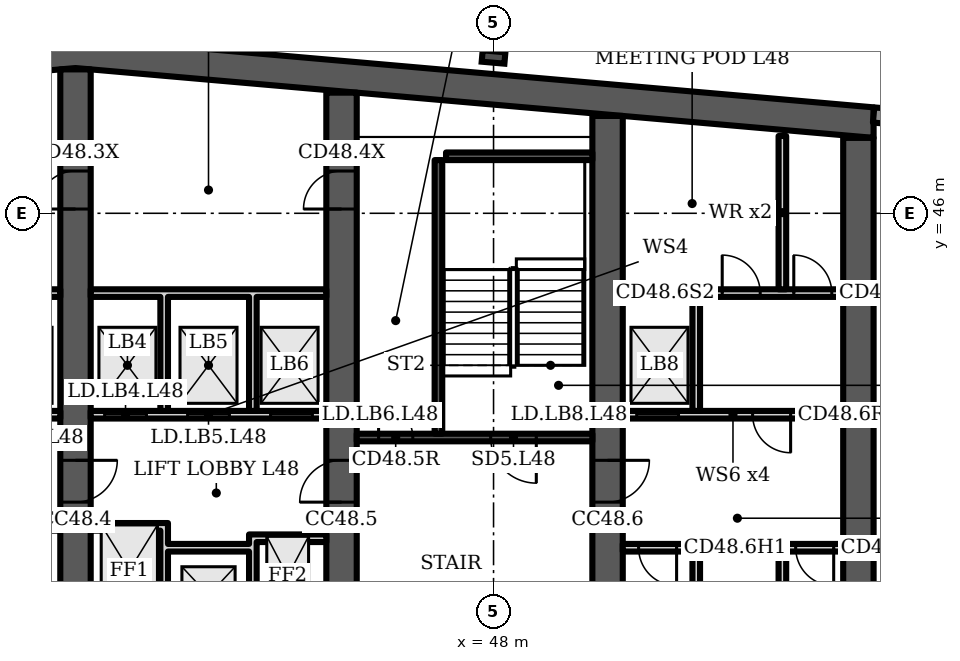
"""IFC4 building model, lengths in metres.
Left out: names, types, materials, properties, quantities, classifications, styles, units other than length and angle.
Written with IfcOpenShell. Run it as: python <this file> out.ifc"""

import sys

from ifc_helpers import new_model, si_unit, direction, frame, frame_2d, origin, origin_2d, place, context, subcontext, project, spatial, polyline, rectangle, i_section, outline, extrude, element, fill, save


model = new_model("IFC4")
c1 = context("Model", 3, precision=1e-05, world=origin(), true_north=direction((0.0, 1.0)))
c2 = subcontext(c1, "Body", "Model", "MODEL_VIEW")
j1 = project(units=[si_unit("LENGTHUNIT", "METRE"), si_unit("PLANEANGLEUNIT", "RADIAN")], contexts=[c1])
p1 = place(None, origin())
s1 = spatial("IfcSite", under=j1, at=p1, CompositionType="ELEMENT")
p2 = place(p1, origin())
s2 = spatial("IfcBuilding", under=s1, at=p2, CompositionType="ELEMENT")
p3 = place(p2, frame((0.0, 0.0, 195.1)))
s3 = spatial("IfcBuildingStorey", under=s2, at=p3, CompositionType="ELEMENT", Elevation=195.1)
p4 = place(p3, frame((0.0, 0.0, -0.0)))
e1 = element("IfcWall", 1, at=p4, inside=s3, PredefinedType="SHEAR", context=c2, shape_type="SweptSolid", body=[
    extrude(outline(polyline([(16.0, 47.984), (37.0, 49.822), (58.0, 47.984), (58.0, 48.787), (37.0, 50.625), (16.0, 48.787), (16.0, 47.984)])), origin(), (0.0, 0.0, 1.0), 3.6),
])
p5 = place(p3, frame((37.0, 34.8, 0.0), z_axis=(0.0, 0.0, 1.0), x_axis=(0.0, 1.0, 0.0)))
e2 = element("IfcWall", 2, at=p5, inside=s3, PredefinedType="SHEAR", context=c2, shape_type="SweptSolid", body=[
    extrude(rectangle(XDim=14.987, YDim=0.8, at=frame_2d((7.493, 0.0))), origin(), (0.0, 0.0, 1.0), 3.6),
])
p6 = place(p5, frame((11.312, 0.0, 0.0)))
e3 = element("IfcOpeningElement", 3, at=p6, cuts=e2, PredefinedType="OPENING", context=c2, shape_type="SweptSolid", body=[
    extrude(rectangle(XDim=1.0, YDim=2.1, at=frame_2d((0.5, 1.05))), frame((0.0, 0.41, 0.0), z_axis=(0.0, -1.0, 0.0), x_axis=(1.0, 0.0, 0.0)), (0.0, 0.0, 1.0), 0.82),
])
p7 = place(p5, frame((3.6, 0.0, 0.0)))
e4 = element("IfcOpeningElement", 4, at=p7, cuts=e2, PredefinedType="OPENING", context=c2, shape_type="SweptSolid", body=[
    extrude(rectangle(XDim=1.1, YDim=2.1, at=frame_2d((0.55, 1.05))), frame((0.0, 0.41, 0.0), z_axis=(0.0, -1.0, 0.0), x_axis=(1.0, 0.0, 0.0)), (0.0, 0.0, 1.0), 0.82),
])
p8 = place(p3, frame((44.0, 34.8, 0.0), z_axis=(0.0, 0.0, 1.0), x_axis=(0.0, 1.0, 0.0)))
e5 = element("IfcWall", 5, at=p8, inside=s3, PredefinedType="SHEAR", context=c2, shape_type="SweptSolid", body=[
    extrude(rectangle(XDim=14.374, YDim=0.8, at=frame_2d((7.187, 0.0))), origin(), (0.0, 0.0, 1.0), 3.6),
])
p9 = place(p8, frame((11.312, 0.0, 0.0)))
e6 = element("IfcOpeningElement", 6, at=p9, cuts=e5, PredefinedType="OPENING", context=c2, shape_type="SweptSolid", body=[
    extrude(rectangle(XDim=1.0, YDim=2.1, at=frame_2d((0.5, 1.05))), frame((0.0, 0.41, 0.0), z_axis=(0.0, -1.0, 0.0), x_axis=(1.0, 0.0, 0.0)), (0.0, 0.0, 1.0), 0.82),
])
p10 = place(p8, frame((3.6, 0.0, 0.0)))
e7 = element("IfcOpeningElement", 7, at=p10, cuts=e5, PredefinedType="OPENING", context=c2, shape_type="SweptSolid", body=[
    extrude(rectangle(XDim=1.1, YDim=2.1, at=frame_2d((0.55, 1.05))), frame((0.0, 0.41, 0.0), z_axis=(0.0, -1.0, 0.0), x_axis=(1.0, 0.0, 0.0)), (0.0, 0.0, 1.0), 0.82),
])
p11 = place(p3, frame((51.0, 34.8, 0.0), z_axis=(0.0, 0.0, 1.0), x_axis=(0.0, 1.0, 0.0)))
e8 = element("IfcWall", 8, at=p11, inside=s3, PredefinedType="SHEAR", context=c2, shape_type="SweptSolid", body=[
    extrude(rectangle(XDim=13.762, YDim=0.8, at=frame_2d((6.881, 0.0))), origin(), (0.0, 0.0, 1.0), 3.6),
])
p12 = place(p11, frame((3.6, 0.0, 0.0)))
e9 = element("IfcOpeningElement", 9, at=p12, cuts=e8, PredefinedType="OPENING", context=c2, shape_type="SweptSolid", body=[
    extrude(rectangle(XDim=1.1, YDim=2.1, at=frame_2d((0.55, 1.05))), frame((0.0, 0.41, 0.0), z_axis=(0.0, -1.0, 0.0), x_axis=(1.0, 0.0, 0.0)), (0.0, 0.0, 1.0), 0.82),
])
p13 = place(p3, frame((57.6, 34.8, 0.0), z_axis=(0.0, 0.0, 1.0), x_axis=(0.0, 1.0, 0.0)))
e10 = element("IfcWall", 10, at=p13, inside=s3, PredefinedType="SHEAR", context=c2, shape_type="SweptSolid", body=[
    extrude(rectangle(XDim=13.184, YDim=0.8, at=frame_2d((6.592, 0.0))), origin(), (0.0, 0.0, 1.0), 3.6),
])
p14 = place(p3, frame((48.0, 50.112, 0.0), z_axis=(0.0, 0.0, 1.0), x_axis=(0.087156, 0.996198, 0.0)))
e11 = element("IfcColumn", 11, at=p14, inside=s3, PredefinedType="COLUMN", context=c2, shape_type="SweptSolid", body=[
    extrude(i_section(OverallWidth=0.3, OverallDepth=0.6, WebThickness=0.015, FlangeThickness=0.03, FilletRadius=0.027, at=origin_2d()), origin(), (0.0, 0.0, 1.0), 3.6),
])
p15 = place(p3, frame((60.983, 48.326, 0.0), z_axis=(0.0, 0.0, 1.0), x_axis=(-0.996194, 0.087168, 0.0)))
e12 = element("IfcWall", 12, at=p15, inside=s3, PredefinedType="SOLIDWALL", context=c2, shape_type="SweptSolid", body=[
    extrude(rectangle(XDim=2.994, YDim=0.4, at=frame_2d((1.497, 0.0))), origin(), (0.0, 0.0, 1.0), 3.2),
])
p16 = place(p3, frame((30.4, 40.7, 0.0), z_axis=(0.0, 0.0, 1.0), x_axis=(1.0, 0.0, 0.0)))
e13 = element("IfcWall", 13, at=p16, inside=s3, PredefinedType="PARTITIONING", context=c2, shape_type="SweptSolid", body=[
    extrude(rectangle(XDim=6.2, YDim=0.2, at=frame_2d((3.1, 0.0))), origin(), (0.0, 0.0, 1.0), 3.2),
])
p17 = place(p16, frame((0.367, 0.0, 0.0)))
e14 = element("IfcOpeningElement", 14, at=p17, cuts=e13, PredefinedType="OPENING", context=c2, shape_type="SweptSolid", body=[
    extrude(rectangle(XDim=1.1, YDim=2.1, at=frame_2d((0.55, 1.05))), frame((0.0, 0.11, 0.0), z_axis=(0.0, -1.0, 0.0), x_axis=(1.0, 0.0, 0.0)), (0.0, 0.0, 1.0), 0.22),
])
p18 = place(p16, frame((2.55, 0.0, 0.0)))
e15 = element("IfcOpeningElement", 15, at=p18, cuts=e13, PredefinedType="OPENING", context=c2, shape_type="SweptSolid", body=[
    extrude(rectangle(XDim=1.1, YDim=2.1, at=frame_2d((0.55, 1.05))), frame((0.0, 0.11, 0.0), z_axis=(0.0, -1.0, 0.0), x_axis=(1.0, 0.0, 0.0)), (0.0, 0.0, 1.0), 0.22),
])
p19 = place(p16, frame((4.733, 0.0, 0.0)))
e16 = element("IfcOpeningElement", 16, at=p19, cuts=e13, PredefinedType="OPENING", context=c2, shape_type="SweptSolid", body=[
    extrude(rectangle(XDim=1.1, YDim=2.1, at=frame_2d((0.55, 1.05))), frame((0.0, 0.11, 0.0), z_axis=(0.0, -1.0, 0.0), x_axis=(1.0, 0.0, 0.0)), (0.0, 0.0, 1.0), 0.22),
])
p20 = place(p3, frame((0.0, 0.0, -0.0)))
e17 = element("IfcWall", 17, at=p20, inside=s3, PredefinedType="PARTITIONING", context=c2, shape_type="SweptSolid", body=[
    extrude(outline(polyline([(34.567, 37.85), (34.767, 37.85), (36.6, 37.85), (36.6, 37.65), (34.767, 37.65), (34.767, 34.8), (34.567, 34.8), (34.567, 37.85)])), origin(), (0.0, 0.0, 1.0), 3.2),
])
p21 = place(p3, frame((0.0, 0.0, -0.0)))
e18 = element("IfcWall", 18, at=p21, inside=s3, PredefinedType="PARTITIONING", context=c2, shape_type="SweptSolid", body=[
    extrude(outline(polyline([(32.433, 40.8), (32.233, 40.8), (32.233, 43.8), (30.4, 43.8), (30.4, 44.0), (36.6, 44.0), (36.6, 43.8), (34.767, 43.8), (34.767, 40.8), (34.567, 40.8), (34.567, 43.8), (32.433, 43.8), (32.433, 40.8)])), origin(), (0.0, 0.0, 1.0), 3.2),
])
p22 = place(p3, frame((37.4, 40.7, 0.0), z_axis=(0.0, 0.0, 1.0), x_axis=(1.0, 0.0, 0.0)))
e19 = element("IfcWall", 19, at=p22, inside=s3, PredefinedType="PARTITIONING", context=c2, shape_type="SweptSolid", body=[
    extrude(rectangle(XDim=6.2, YDim=0.2, at=frame_2d((3.1, 0.0))), origin(), (0.0, 0.0, 1.0), 3.2),
])
p23 = place(p22, frame((0.367, 0.0, 0.0)))
e20 = element("IfcOpeningElement", 20, at=p23, cuts=e19, PredefinedType="OPENING", context=c2, shape_type="SweptSolid", body=[
    extrude(rectangle(XDim=1.1, YDim=2.1, at=frame_2d((0.55, 1.05))), frame((0.0, 0.11, 0.0), z_axis=(0.0, -1.0, 0.0), x_axis=(1.0, 0.0, 0.0)), (0.0, 0.0, 1.0), 0.22),
])
p24 = place(p22, frame((2.55, 0.0, 0.0)))
e21 = element("IfcOpeningElement", 21, at=p24, cuts=e19, PredefinedType="OPENING", context=c2, shape_type="SweptSolid", body=[
    extrude(rectangle(XDim=1.1, YDim=2.1, at=frame_2d((0.55, 1.05))), frame((0.0, 0.11, 0.0), z_axis=(0.0, -1.0, 0.0), x_axis=(1.0, 0.0, 0.0)), (0.0, 0.0, 1.0), 0.22),
])
p25 = place(p22, frame((4.733, 0.0, 0.0)))
e22 = element("IfcOpeningElement", 22, at=p25, cuts=e19, PredefinedType="OPENING", context=c2, shape_type="SweptSolid", body=[
    extrude(rectangle(XDim=1.1, YDim=2.1, at=frame_2d((0.55, 1.05))), frame((0.0, 0.11, 0.0), z_axis=(0.0, -1.0, 0.0), x_axis=(1.0, 0.0, 0.0)), (0.0, 0.0, 1.0), 0.22),
])
p26 = place(p3, frame((0.0, 0.0, -0.0)))
e23 = element("IfcWall", 23, at=p26, inside=s3, PredefinedType="PARTITIONING", context=c2, shape_type="SweptSolid", body=[
    extrude(outline(polyline([(41.567, 37.1), (39.433, 37.1), (39.433, 34.8), (39.233, 34.8), (39.233, 37.65), (37.4, 37.65), (37.4, 37.85), (39.233, 37.85), (39.433, 37.85), (39.433, 37.3), (41.567, 37.3), (41.567, 37.55), (41.767, 37.55), (43.6, 37.55), (43.6, 37.35), (41.767, 37.35), (41.767, 34.8), (41.567, 34.8), (41.567, 37.1)])), origin(), (0.0, 0.0, 1.0), 3.2),
])
p27 = place(p3, frame((0.0, 0.0, -0.0)))
e24 = element("IfcWall", 24, at=p27, inside=s3, PredefinedType="PARTITIONING", context=c2, shape_type="SweptSolid", body=[
    extrude(outline(polyline([(39.433, 40.8), (39.233, 40.8), (39.233, 43.8), (37.4, 43.8), (37.4, 44.0), (43.6, 44.0), (43.6, 43.8), (41.767, 43.8), (41.767, 40.8), (41.567, 40.8), (41.567, 43.8), (39.433, 43.8), (39.433, 40.8)])), origin(), (0.0, 0.0, 1.0), 3.2),
])
p28 = place(p3, frame((44.4, 40.1, 0.0), z_axis=(0.0, 0.0, 1.0), x_axis=(1.0, 0.0, 0.0)))
e25 = element("IfcWall", 25, at=p28, inside=s3, PredefinedType="SHEAR", context=c2, shape_type="SweptSolid", body=[
    extrude(rectangle(XDim=6.2, YDim=0.2, at=frame_2d((3.1, 0.0))), origin(), (0.0, 0.0, 1.0), 3.2),
])
p29 = place(p28, frame((3.525, 0.0, 0.0)))
e26 = element("IfcOpeningElement", 26, at=p29, cuts=e25, PredefinedType="OPENING", context=c2, shape_type="SweptSolid", body=[
    extrude(rectangle(XDim=1.2, YDim=2.1, at=frame_2d((0.6, 1.05))), frame((0.0, 0.11, 0.0), z_axis=(0.0, -1.0, 0.0), x_axis=(1.0, 0.0, 0.0)), (0.0, 0.0, 1.0), 0.22),
])
p30 = place(p28, frame((0.575, 0.0, 0.0)))
e27 = element("IfcOpeningElement", 27, at=p30, cuts=e25, PredefinedType="OPENING", context=c2, shape_type="SweptSolid", body=[
    extrude(rectangle(XDim=0.9, YDim=2.1, at=frame_2d((0.45, 1.05))), frame((0.0, 0.11, 0.0), z_axis=(0.0, -1.0, 0.0), x_axis=(1.0, 0.0, 0.0)), (0.0, 0.0, 1.0), 0.22),
])
p31 = place(p3, frame((46.55, 40.2, 0.0), z_axis=(0.0, 0.0, 1.0), x_axis=(0.0, 1.0, 0.0)))
e28 = element("IfcWall", 28, at=p31, inside=s3, PredefinedType="SHEAR", context=c2, shape_type="SweptSolid", body=[
    extrude(rectangle(XDim=7.2, YDim=0.2, at=frame_2d((3.6, 0.0))), origin(), (0.0, 0.0, 1.0), 3.2),
])
p32 = place(p3, frame((46.75, 47.5, 0.0), z_axis=(0.0, 0.0, 1.0), x_axis=(1.0, 0.0, 0.0)))
e29 = element("IfcWall", 29, at=p32, inside=s3, PredefinedType="SHEAR", context=c2, shape_type="SweptSolid", body=[
    extrude(rectangle(XDim=3.85, YDim=0.2, at=frame_2d((1.925, 0.0))), origin(), (0.0, 0.0, 1.0), 3.2),
])
p33 = place(p3, frame((51.4, 37.2, 0.0), z_axis=(0.0, 0.0, 1.0), x_axis=(1.0, 0.0, 0.0)))
e30 = element("IfcWall", 30, at=p33, inside=s3, PredefinedType="PARTITIONING", context=c2, shape_type="SweptSolid", body=[
    extrude(rectangle(XDim=1.833, YDim=0.2, at=frame_2d((0.917, 0.0))), origin(), (0.0, 0.0, 1.0), 3.2),
])
p34 = place(p33, frame((0.417, 0.0, 0.0)))
e31 = element("IfcOpeningElement", 31, at=p34, cuts=e30, PredefinedType="OPENING", context=c2, shape_type="SweptSolid", body=[
    extrude(rectangle(XDim=1.0, YDim=2.1, at=frame_2d((0.5, 1.05))), frame((0.0, 0.11, 0.0), z_axis=(0.0, -1.0, 0.0), x_axis=(1.0, 0.0, 0.0)), (0.0, 0.0, 1.0), 0.22),
])
p35 = place(p3, frame((55.7, 37.2, 0.0), z_axis=(0.0, 0.0, 1.0), x_axis=(1.0, 0.0, 0.0)))
e32 = element("IfcWall", 32, at=p35, inside=s3, PredefinedType="PARTITIONING", context=c2, shape_type="SweptSolid", body=[
    extrude(rectangle(XDim=1.5, YDim=0.2, at=frame_2d((0.75, 0.0))), origin(), (0.0, 0.0, 1.0), 3.2),
])
p36 = place(p35, frame((0.25, 0.0, 0.0)))
e33 = element("IfcOpeningElement", 33, at=p36, cuts=e32, PredefinedType="OPENING", context=c2, shape_type="SweptSolid", body=[
    extrude(rectangle(XDim=1.0, YDim=2.1, at=frame_2d((0.5, 1.05))), frame((0.0, 0.11, 0.0), z_axis=(0.0, -1.0, 0.0), x_axis=(1.0, 0.0, 0.0)), (0.0, 0.0, 1.0), 0.22),
])
p37 = place(p3, frame((51.4, 40.7, 0.0), z_axis=(0.0, 0.0, 1.0), x_axis=(1.0, 0.0, 0.0)))
e34 = element("IfcWall", 34, at=p37, inside=s3, PredefinedType="PARTITIONING", context=c2, shape_type="SweptSolid", body=[
    extrude(rectangle(XDim=5.8, YDim=0.2, at=frame_2d((2.9, 0.0))), origin(), (0.0, 0.0, 1.0), 3.2),
])
p38 = place(p37, frame((0.367, 0.0, 0.0)))
e35 = element("IfcOpeningElement", 35, at=p38, cuts=e34, PredefinedType="OPENING", context=c2, shape_type="SweptSolid", body=[
    extrude(rectangle(XDim=1.1, YDim=2.1, at=frame_2d((0.55, 1.05))), frame((0.0, 0.11, 0.0), z_axis=(0.0, -1.0, 0.0), x_axis=(1.0, 0.0, 0.0)), (0.0, 0.0, 1.0), 0.22),
])
p39 = place(p37, frame((3.417, 0.0, 0.0)))
e36 = element("IfcOpeningElement", 36, at=p39, cuts=e34, PredefinedType="OPENING", context=c2, shape_type="SweptSolid", body=[
    extrude(rectangle(XDim=1.0, YDim=2.1, at=frame_2d((0.5, 1.05))), frame((0.0, 0.11, 0.0), z_axis=(0.0, -1.0, 0.0), x_axis=(1.0, 0.0, 0.0)), (0.0, 0.0, 1.0), 0.22),
])
p40 = place(p3, frame((51.4, 43.9, 0.0), z_axis=(0.0, 0.0, 1.0), x_axis=(1.0, 0.0, 0.0)))
e37 = element("IfcWall", 37, at=p40, inside=s3, PredefinedType="PARTITIONING", context=c2, shape_type="SweptSolid", body=[
    extrude(rectangle(XDim=5.8, YDim=0.2, at=frame_2d((2.9, 0.0))), origin(), (0.0, 0.0, 1.0), 3.2),
])
p41 = place(p40, frame((2.617, 0.0, 0.0)))
e38 = element("IfcOpeningElement", 38, at=p41, cuts=e37, PredefinedType="OPENING", context=c2, shape_type="SweptSolid", body=[
    extrude(rectangle(XDim=1.0, YDim=2.1, at=frame_2d((0.5, 1.05))), frame((0.0, 0.11, 0.0), z_axis=(0.0, -1.0, 0.0), x_axis=(1.0, 0.0, 0.0)), (0.0, 0.0, 1.0), 0.22),
])
p42 = place(p40, frame((4.5, 0.0, 0.0)))
e39 = element("IfcOpeningElement", 39, at=p42, cuts=e37, PredefinedType="OPENING", context=c2, shape_type="SweptSolid", body=[
    extrude(rectangle(XDim=1.0, YDim=2.1, at=frame_2d((0.5, 1.05))), frame((0.0, 0.11, 0.0), z_axis=(0.0, -1.0, 0.0), x_axis=(1.0, 0.0, 0.0)), (0.0, 0.0, 1.0), 0.22),
])
p43 = place(p3, frame((0.0, 0.0, -0.0)))
e40 = element("IfcWall", 40, at=p43, inside=s3, PredefinedType="PARTITIONING", context=c2, shape_type="SweptSolid", body=[
    extrude(outline(polyline([(53.233, 34.8), (53.233, 37.3), (53.433, 37.3), (53.433, 34.8), (53.233, 34.8)])), origin(), (0.0, 0.0, 1.0), 3.2),
])
p44 = place(p3, frame((0.0, 0.0, -0.0)))
e41 = element("IfcWall", 41, at=p44, inside=s3, PredefinedType="PARTITIONING", context=c2, shape_type="SweptSolid", body=[
    extrude(outline(polyline([(55.5, 34.8), (55.5, 37.3), (55.7, 37.3), (55.7, 34.8), (55.5, 34.8)])), origin(), (0.0, 0.0, 1.0), 3.2),
])
p45 = place(p3, frame((0.0, 0.0, -0.0)))
e42 = element("IfcWall", 42, at=p45, inside=s3, PredefinedType="PARTITIONING", context=c2, shape_type="SweptSolid", body=[
    extrude(outline(polyline([(53.433, 40.8), (53.433, 43.8), (53.233, 43.8), (53.233, 40.8), (53.433, 40.8)])), origin(), (0.0, 0.0, 1.0), 3.2),
])
p46 = place(p3, frame((55.6, 44.0, 0.0), z_axis=(0.0, 0.0, 1.0), x_axis=(0.0, 1.0, 0.0)))
e43 = element("IfcWall", 43, at=p46, inside=s3, PredefinedType="PARTITIONING", context=c2, shape_type="SweptSolid", body=[
    extrude(rectangle(XDim=4.034, YDim=0.2, at=frame_2d((2.017, 0.0))), origin(), (0.0, 0.0, 1.0), 3.2),
])
p47 = place(p6, origin())
e44 = element("IfcDoor", 44, at=p47, inside=s3, OperationType="SINGLE_SWING_LEFT", PredefinedType="DOOR", context=c2, shape_type="SweptSolid", body=[
    extrude(rectangle(XDim=1.0, YDim=2.1, at=frame_2d((0.5, 1.05))), frame((0.0, 0.4, 0.0), z_axis=(0.0, -1.0, 0.0), x_axis=(1.0, 0.0, 0.0)), (0.0, 0.0, 1.0), 0.8),
])
fill(e3, e44)
p48 = place(p23, origin())
e45 = element("IfcDoor", 45, at=p48, inside=s3, OperationType="DOUBLE_DOOR_SLIDING", PredefinedType="DOOR", context=c2, shape_type="SweptSolid", body=[
    extrude(rectangle(XDim=1.1, YDim=2.1, at=frame_2d((0.55, 1.05))), frame((0.0, 0.025, 0.0), z_axis=(0.0, -1.0, 0.0), x_axis=(1.0, 0.0, 0.0)), (0.0, 0.0, 1.0), 0.05),
])
fill(e20, e45)
p49 = place(p24, origin())
e46 = element("IfcDoor", 46, at=p49, inside=s3, OperationType="DOUBLE_DOOR_SLIDING", PredefinedType="DOOR", context=c2, shape_type="SweptSolid", body=[
    extrude(rectangle(XDim=1.1, YDim=2.1, at=frame_2d((0.55, 1.05))), frame((0.0, 0.025, 0.0), z_axis=(0.0, -1.0, 0.0), x_axis=(1.0, 0.0, 0.0)), (0.0, 0.0, 1.0), 0.05),
])
fill(e21, e46)
p50 = place(p25, origin())
e47 = element("IfcDoor", 47, at=p50, inside=s3, OperationType="DOUBLE_DOOR_SLIDING", PredefinedType="DOOR", context=c2, shape_type="SweptSolid", body=[
    extrude(rectangle(XDim=1.1, YDim=2.1, at=frame_2d((0.55, 1.05))), frame((0.0, 0.025, 0.0), z_axis=(0.0, -1.0, 0.0), x_axis=(1.0, 0.0, 0.0)), (0.0, 0.0, 1.0), 0.05),
])
fill(e22, e47)
p51 = place(p9, origin())
e48 = element("IfcDoor", 48, at=p51, inside=s3, OperationType="SINGLE_SWING_LEFT", PredefinedType="DOOR", context=c2, shape_type="SweptSolid", body=[
    extrude(rectangle(XDim=1.0, YDim=2.1, at=frame_2d((0.5, 1.05))), frame((0.0, 0.4, 0.0), z_axis=(0.0, -1.0, 0.0), x_axis=(1.0, 0.0, 0.0)), (0.0, 0.0, 1.0), 0.8),
])
fill(e6, e48)
p52 = place(p29, origin())
e49 = element("IfcDoor", 49, at=p52, inside=s3, OperationType="SINGLE_SWING_RIGHT", PredefinedType="DOOR", context=c2, shape_type="SweptSolid", body=[
    extrude(rectangle(XDim=1.2, YDim=2.1, at=frame_2d((0.6, 1.05))), frame((0.0, 0.025, 0.0), z_axis=(0.0, -1.0, 0.0), x_axis=(1.0, 0.0, 0.0)), (0.0, 0.0, 1.0), 0.05),
])
fill(e26, e49)
p53 = place(p30, origin())
e50 = element("IfcDoor", 50, at=p53, inside=s3, OperationType="SINGLE_SWING_LEFT", PredefinedType="DOOR", context=c2, shape_type="SweptSolid", body=[
    extrude(rectangle(XDim=0.9, YDim=2.1, at=frame_2d((0.45, 1.05))), frame((0.0, 0.025, 0.0), z_axis=(0.0, -1.0, 0.0), x_axis=(1.0, 0.0, 0.0)), (0.0, 0.0, 1.0), 0.05),
])
fill(e27, e50)
p54 = place(p34, origin())
e51 = element("IfcDoor", 51, at=p54, inside=s3, OperationType="SINGLE_SWING_RIGHT", PredefinedType="DOOR", context=c2, shape_type="SweptSolid", body=[
    extrude(rectangle(XDim=1.0, YDim=2.1, at=frame_2d((0.5, 1.05))), frame((0.0, 0.025, 0.0), z_axis=(0.0, -1.0, 0.0), x_axis=(1.0, 0.0, 0.0)), (0.0, 0.0, 1.0), 0.05),
])
fill(e31, e51)
p55 = place(p36, origin())
e52 = element("IfcDoor", 52, at=p55, inside=s3, OperationType="SINGLE_SWING_RIGHT", PredefinedType="DOOR", context=c2, shape_type="SweptSolid", body=[
    extrude(rectangle(XDim=1.0, YDim=2.1, at=frame_2d((0.5, 1.05))), frame((0.0, 0.025, 0.0), z_axis=(0.0, -1.0, 0.0), x_axis=(1.0, 0.0, 0.0)), (0.0, 0.0, 1.0), 0.05),
])
fill(e33, e52)
p56 = place(p38, origin())
e53 = element("IfcDoor", 53, at=p56, inside=s3, OperationType="DOUBLE_DOOR_SLIDING", PredefinedType="DOOR", context=c2, shape_type="SweptSolid", body=[
    extrude(rectangle(XDim=1.1, YDim=2.1, at=frame_2d((0.55, 1.05))), frame((0.0, 0.025, 0.0), z_axis=(0.0, -1.0, 0.0), x_axis=(1.0, 0.0, 0.0)), (0.0, 0.0, 1.0), 0.05),
])
fill(e35, e53)
p57 = place(p39, origin())
e54 = element("IfcDoor", 54, at=p57, inside=s3, OperationType="SINGLE_SWING_RIGHT", PredefinedType="DOOR", context=c2, shape_type="SweptSolid", body=[
    extrude(rectangle(XDim=1.0, YDim=2.1, at=frame_2d((0.5, 1.05))), frame((0.0, 0.025, 0.0), z_axis=(0.0, -1.0, 0.0), x_axis=(1.0, 0.0, 0.0)), (0.0, 0.0, 1.0), 0.05),
])
fill(e36, e54)
p58 = place(p41, origin())
e55 = element("IfcDoor", 55, at=p58, inside=s3, OperationType="SINGLE_SWING_LEFT", PredefinedType="DOOR", context=c2, shape_type="SweptSolid", body=[
    extrude(rectangle(XDim=1.0, YDim=2.1, at=frame_2d((0.5, 1.05))), frame((0.0, 0.025, 0.0), z_axis=(0.0, -1.0, 0.0), x_axis=(1.0, 0.0, 0.0)), (0.0, 0.0, 1.0), 0.05),
])
fill(e38, e55)
p59 = place(p42, origin())
e56 = element("IfcDoor", 56, at=p59, inside=s3, OperationType="SINGLE_SWING_LEFT", PredefinedType="DOOR", context=c2, shape_type="SweptSolid", body=[
    extrude(rectangle(XDim=1.0, YDim=2.1, at=frame_2d((0.5, 1.05))), frame((0.0, 0.025, 0.0), z_axis=(0.0, -1.0, 0.0), x_axis=(1.0, 0.0, 0.0)), (0.0, 0.0, 1.0), 0.05),
])
fill(e39, e56)
p60 = place(p7, origin())
e57 = element("IfcDoor", 57, at=p60, inside=s3, OperationType="SINGLE_SWING_RIGHT", PredefinedType="DOOR", context=c2, shape_type="SweptSolid", body=[
    extrude(rectangle(XDim=1.1, YDim=2.1, at=frame_2d((0.55, 1.05))), frame((0.0, 0.025, 0.0), z_axis=(0.0, -1.0, 0.0), x_axis=(1.0, 0.0, 0.0)), (0.0, 0.0, 1.0), 0.05),
])
fill(e4, e57)
p61 = place(p10, origin())
e58 = element("IfcDoor", 58, at=p61, inside=s3, OperationType="SINGLE_SWING_LEFT", PredefinedType="DOOR", context=c2, shape_type="SweptSolid", body=[
    extrude(rectangle(XDim=1.1, YDim=2.1, at=frame_2d((0.55, 1.05))), frame((0.0, 0.025, 0.0), z_axis=(0.0, -1.0, 0.0), x_axis=(1.0, 0.0, 0.0)), (0.0, 0.0, 1.0), 0.05),
])
fill(e7, e58)
p62 = place(p12, origin())
e59 = element("IfcDoor", 59, at=p62, inside=s3, OperationType="SINGLE_SWING_RIGHT", PredefinedType="DOOR", context=c2, shape_type="SweptSolid", body=[
    extrude(rectangle(XDim=1.1, YDim=2.1, at=frame_2d((0.55, 1.05))), frame((0.0, 0.025, 0.0), z_axis=(0.0, -1.0, 0.0), x_axis=(1.0, 0.0, 0.0)), (0.0, 0.0, 1.0), 0.05),
])
fill(e9, e59)
save(model, sys.argv[1])
